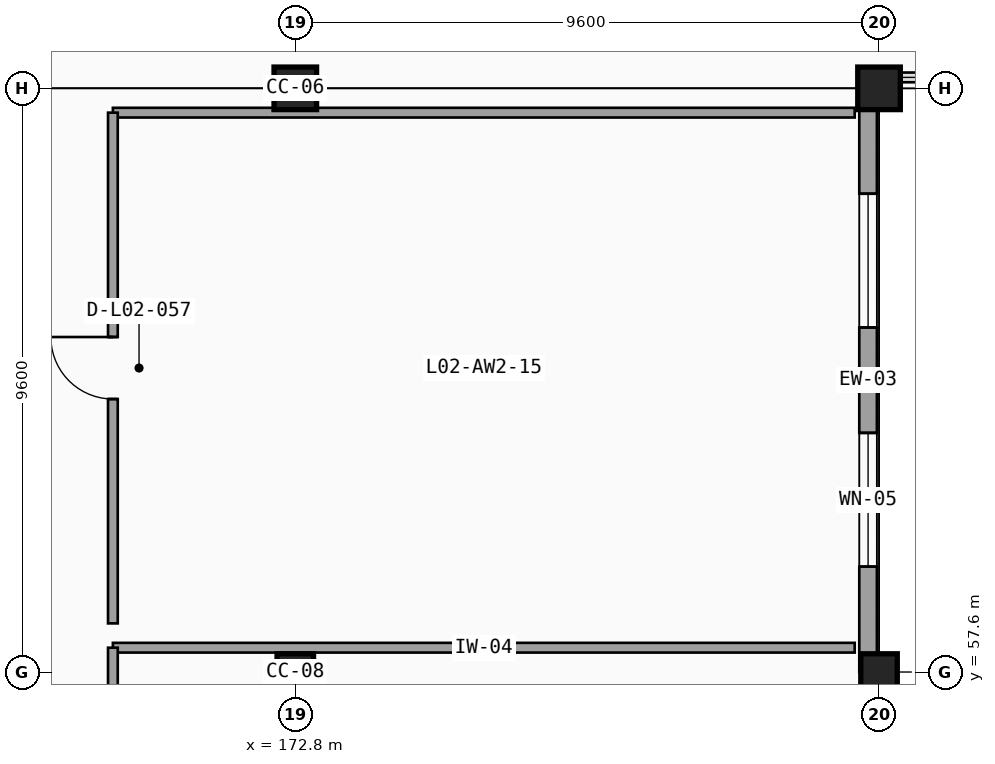
"""IFC4 building model, lengths in metres.
Left out: names, types, materials, properties, quantities, classifications, styles, units other than length and angle.
Written with IfcOpenShell. Run it as: python <this file> out.ifc"""

import sys

from ifc_helpers import new_model, si_unit, direction, frame, frame_2d, origin, origin_2d, place, context, subcontext, project, spatial, rectangle, extrude, element, fill, save


model = new_model("IFC4")
c1 = context("Model", 3, precision=1e-05, world=origin(), true_north=direction((0.0, 1.0)))
c2 = subcontext(c1, "Body", "Model", "MODEL_VIEW")
j1 = project(units=[si_unit("LENGTHUNIT", "METRE"), si_unit("PLANEANGLEUNIT", "RADIAN")], contexts=[c1])
p1 = place(None, origin())
s1 = spatial("IfcSite", under=j1, at=p1, CompositionType="ELEMENT")
p2 = place(p1, origin())
s2 = spatial("IfcBuilding", under=s1, at=p2, CompositionType="ELEMENT")
p3 = place(p2, frame((0.0, 0.0, 9.6)))
s3 = spatial("IfcBuildingStorey", under=s2, at=p3, CompositionType="ELEMENT", Elevation=9.6)
p4 = place(p3, frame((172.8, 57.6, 0.0), z_axis=(0.0, 0.0, 1.0), x_axis=(1.0, 0.0, 0.0)))
e1 = element("IfcColumn", 1, at=p4, inside=s3, PredefinedType="COLUMN", context=c2, shape_type="SweptSolid", body=[
    extrude(rectangle(XDim=0.6, YDim=0.6, at=origin_2d()), origin(), (0.0, 0.0, 1.0), 4.5),
])
p5 = place(p3, frame((172.8, 67.2, 0.0), z_axis=(0.0, 0.0, 1.0), x_axis=(1.0, 0.0, 0.0)))
e2 = element("IfcColumn", 2, at=p5, inside=s3, PredefinedType="COLUMN", context=c2, shape_type="SweptSolid", body=[
    extrude(rectangle(XDim=0.7, YDim=0.7, at=origin_2d()), origin(), (0.0, 0.0, 1.0), 4.5),
])
p6 = place(p3, frame((182.4, 57.6, 0.0), z_axis=(0.0, 0.0, 1.0), x_axis=(1.0, 0.0, 0.0)))
e3 = element("IfcColumn", 3, at=p6, inside=s3, PredefinedType="COLUMN", context=c2, shape_type="SweptSolid", body=[
    extrude(rectangle(XDim=0.6, YDim=0.6, at=origin_2d()), origin(), (0.0, 0.0, 1.0), 4.5),
])
p7 = place(p3, frame((182.4, 67.2, 0.0), z_axis=(0.0, 0.0, 1.0), x_axis=(1.0, 0.0, 0.0)))
e4 = element("IfcColumn", 4, at=p7, inside=s3, PredefinedType="COLUMN", context=c2, shape_type="SweptSolid", body=[
    extrude(rectangle(XDim=0.7, YDim=0.7, at=origin_2d()), origin(), (0.0, 0.0, 1.0), 4.5),
])
p8 = place(p3, frame((182.22, 57.6, 0.0), z_axis=(0.0, 0.0, 1.0), x_axis=(0.0, 1.0, 0.0)))
e5 = element("IfcWall", 5, at=p8, inside=s3, PredefinedType="SOLIDWALL", context=c2, shape_type="SweptSolid", body=[
    extrude(rectangle(XDim=9.6, YDim=0.29, at=frame_2d((4.8, 0.0))), origin(), (0.0, 0.0, 1.0), 3.613),
])
p9 = place(p8, frame((3.933, 0.0, 0.95), z_axis=(0.0, 0.0, 1.0), x_axis=(-1.0, 0.0, 0.0)))
e6 = element("IfcOpeningElement", 6, at=p9, cuts=e5, PredefinedType="OPENING", context=c2, shape_type="SweptSolid", body=[
    extrude(rectangle(XDim=2.2, YDim=2.1, at=frame_2d((1.1, 1.05))), frame((0.0, 0.155, 0.0), z_axis=(0.0, -1.0, 0.0), x_axis=(1.0, 0.0, 0.0)), (0.0, 0.0, 1.0), 0.31),
])
p10 = place(p8, frame((7.867, 0.0, 0.95), z_axis=(0.0, 0.0, 1.0), x_axis=(-1.0, 0.0, 0.0)))
e7 = element("IfcOpeningElement", 7, at=p10, cuts=e5, PredefinedType="OPENING", context=c2, shape_type="SweptSolid", body=[
    extrude(rectangle(XDim=2.2, YDim=2.1, at=frame_2d((1.1, 1.05))), frame((0.0, 0.155, 0.0), z_axis=(0.0, -1.0, 0.0), x_axis=(1.0, 0.0, 0.0)), (0.0, 0.0, 1.0), 0.31),
])
p11 = place(p3, frame((169.8, 58.0, 0.0), z_axis=(0.0, 0.0, 1.0), x_axis=(1.0, 0.0, 0.0)))
e8 = element("IfcWall", 8, at=p11, inside=s3, PredefinedType="PARTITIONING", context=c2, shape_type="SweptSolid", body=[
    extrude(rectangle(XDim=12.2, YDim=0.16, at=frame_2d((6.1, 0.0))), origin(), (0.0, 0.0, 1.0), 3.613),
])
p12 = place(p3, frame((169.8, 48.5, 0.0), z_axis=(0.0, 0.0, 1.0), x_axis=(0.0, 1.0, 0.0)))
e9 = element("IfcWall", 9, at=p12, inside=s3, PredefinedType="PARTITIONING", context=c2, shape_type="SweptSolid", body=[
    extrude(rectangle(XDim=9.5, YDim=0.16, at=frame_2d((4.75, 0.0))), origin(), (0.0, 0.0, 1.0), 3.466),
])
p13 = place(p12, frame((4.29, 0.0, 0.0), z_axis=(0.0, 0.0, 1.0), x_axis=(1.0, 0.0, 0.0)))
e10 = element("IfcOpeningElement", 10, at=p13, cuts=e9, PredefinedType="OPENING", context=c2, shape_type="SweptSolid", body=[
    extrude(rectangle(XDim=0.92, YDim=2.12, at=frame_2d((0.46, 1.06))), frame((0.0, 0.09, 0.0), z_axis=(0.0, -1.0, 0.0), x_axis=(1.0, 0.0, 0.0)), (0.0, 0.0, 1.0), 0.18),
])
p14 = place(p3, frame((169.8, 66.8, 0.0), z_axis=(0.0, 0.0, 1.0), x_axis=(1.0, 0.0, 0.0)))
e11 = element("IfcWall", 11, at=p14, inside=s3, PredefinedType="PARTITIONING", context=c2, shape_type="SweptSolid", body=[
    extrude(rectangle(XDim=12.2, YDim=0.16, at=frame_2d((6.1, 0.0))), origin(), (0.0, 0.0, 1.0), 3.613),
])
p15 = place(p3, frame((169.8, 58.4, 0.0), z_axis=(0.0, 0.0, 1.0), x_axis=(0.0, 1.0, 0.0)))
e12 = element("IfcWall", 12, at=p15, inside=s3, PredefinedType="PARTITIONING", context=c2, shape_type="SweptSolid", body=[
    extrude(rectangle(XDim=8.4, YDim=0.16, at=frame_2d((4.2, 0.0))), origin(), (0.0, 0.0, 1.0), 3.765),
])
p16 = place(p15, frame((3.69, 0.0, 0.0), z_axis=(0.0, 0.0, 1.0), x_axis=(1.0, 0.0, 0.0)))
e13 = element("IfcOpeningElement", 13, at=p16, cuts=e12, PredefinedType="OPENING", context=c2, shape_type="SweptSolid", body=[
    extrude(rectangle(XDim=1.02, YDim=2.15, at=frame_2d((0.51, 1.075))), frame((0.0, 0.09, 0.0), z_axis=(0.0, -1.0, 0.0), x_axis=(1.0, 0.0, 0.0)), (0.0, 0.0, 1.0), 0.18),
])
p17 = place(p9, origin())
e14 = element("IfcWindow", 14, at=p17, inside=s3, PartitioningType="SINGLE_PANEL", PredefinedType="WINDOW", context=c2, shape_type="SweptSolid", body=[
    extrude(rectangle(XDim=2.2, YDim=2.1, at=frame_2d((1.1, 1.05))), frame((0.0, 0.03, 0.0), z_axis=(0.0, -1.0, 0.0), x_axis=(1.0, 0.0, 0.0)), (0.0, 0.0, 1.0), 0.06),
])
fill(e6, e14)
p18 = place(p10, origin())
e15 = element("IfcWindow", 15, at=p18, inside=s3, PartitioningType="SINGLE_PANEL", PredefinedType="WINDOW", context=c2, shape_type="SweptSolid", body=[
    extrude(rectangle(XDim=2.2, YDim=2.1, at=frame_2d((1.1, 1.05))), frame((0.0, 0.03, 0.0), z_axis=(0.0, -1.0, 0.0), x_axis=(1.0, 0.0, 0.0)), (0.0, 0.0, 1.0), 0.06),
])
fill(e7, e15)
p19 = place(p16, origin())
e16 = element("IfcDoor", 16, at=p19, inside=s3, OperationType="SINGLE_SWING_RIGHT", PredefinedType="DOOR", context=c2, shape_type="SweptSolid", body=[
    extrude(rectangle(XDim=1.02, YDim=2.15, at=frame_2d((0.51, 1.075))), frame((0.0, 0.025, 0.0), z_axis=(0.0, -1.0, 0.0), x_axis=(1.0, 0.0, 0.0)), (0.0, 0.0, 1.0), 0.05),
])
fill(e13, e16)
save(model, sys.argv[1])
